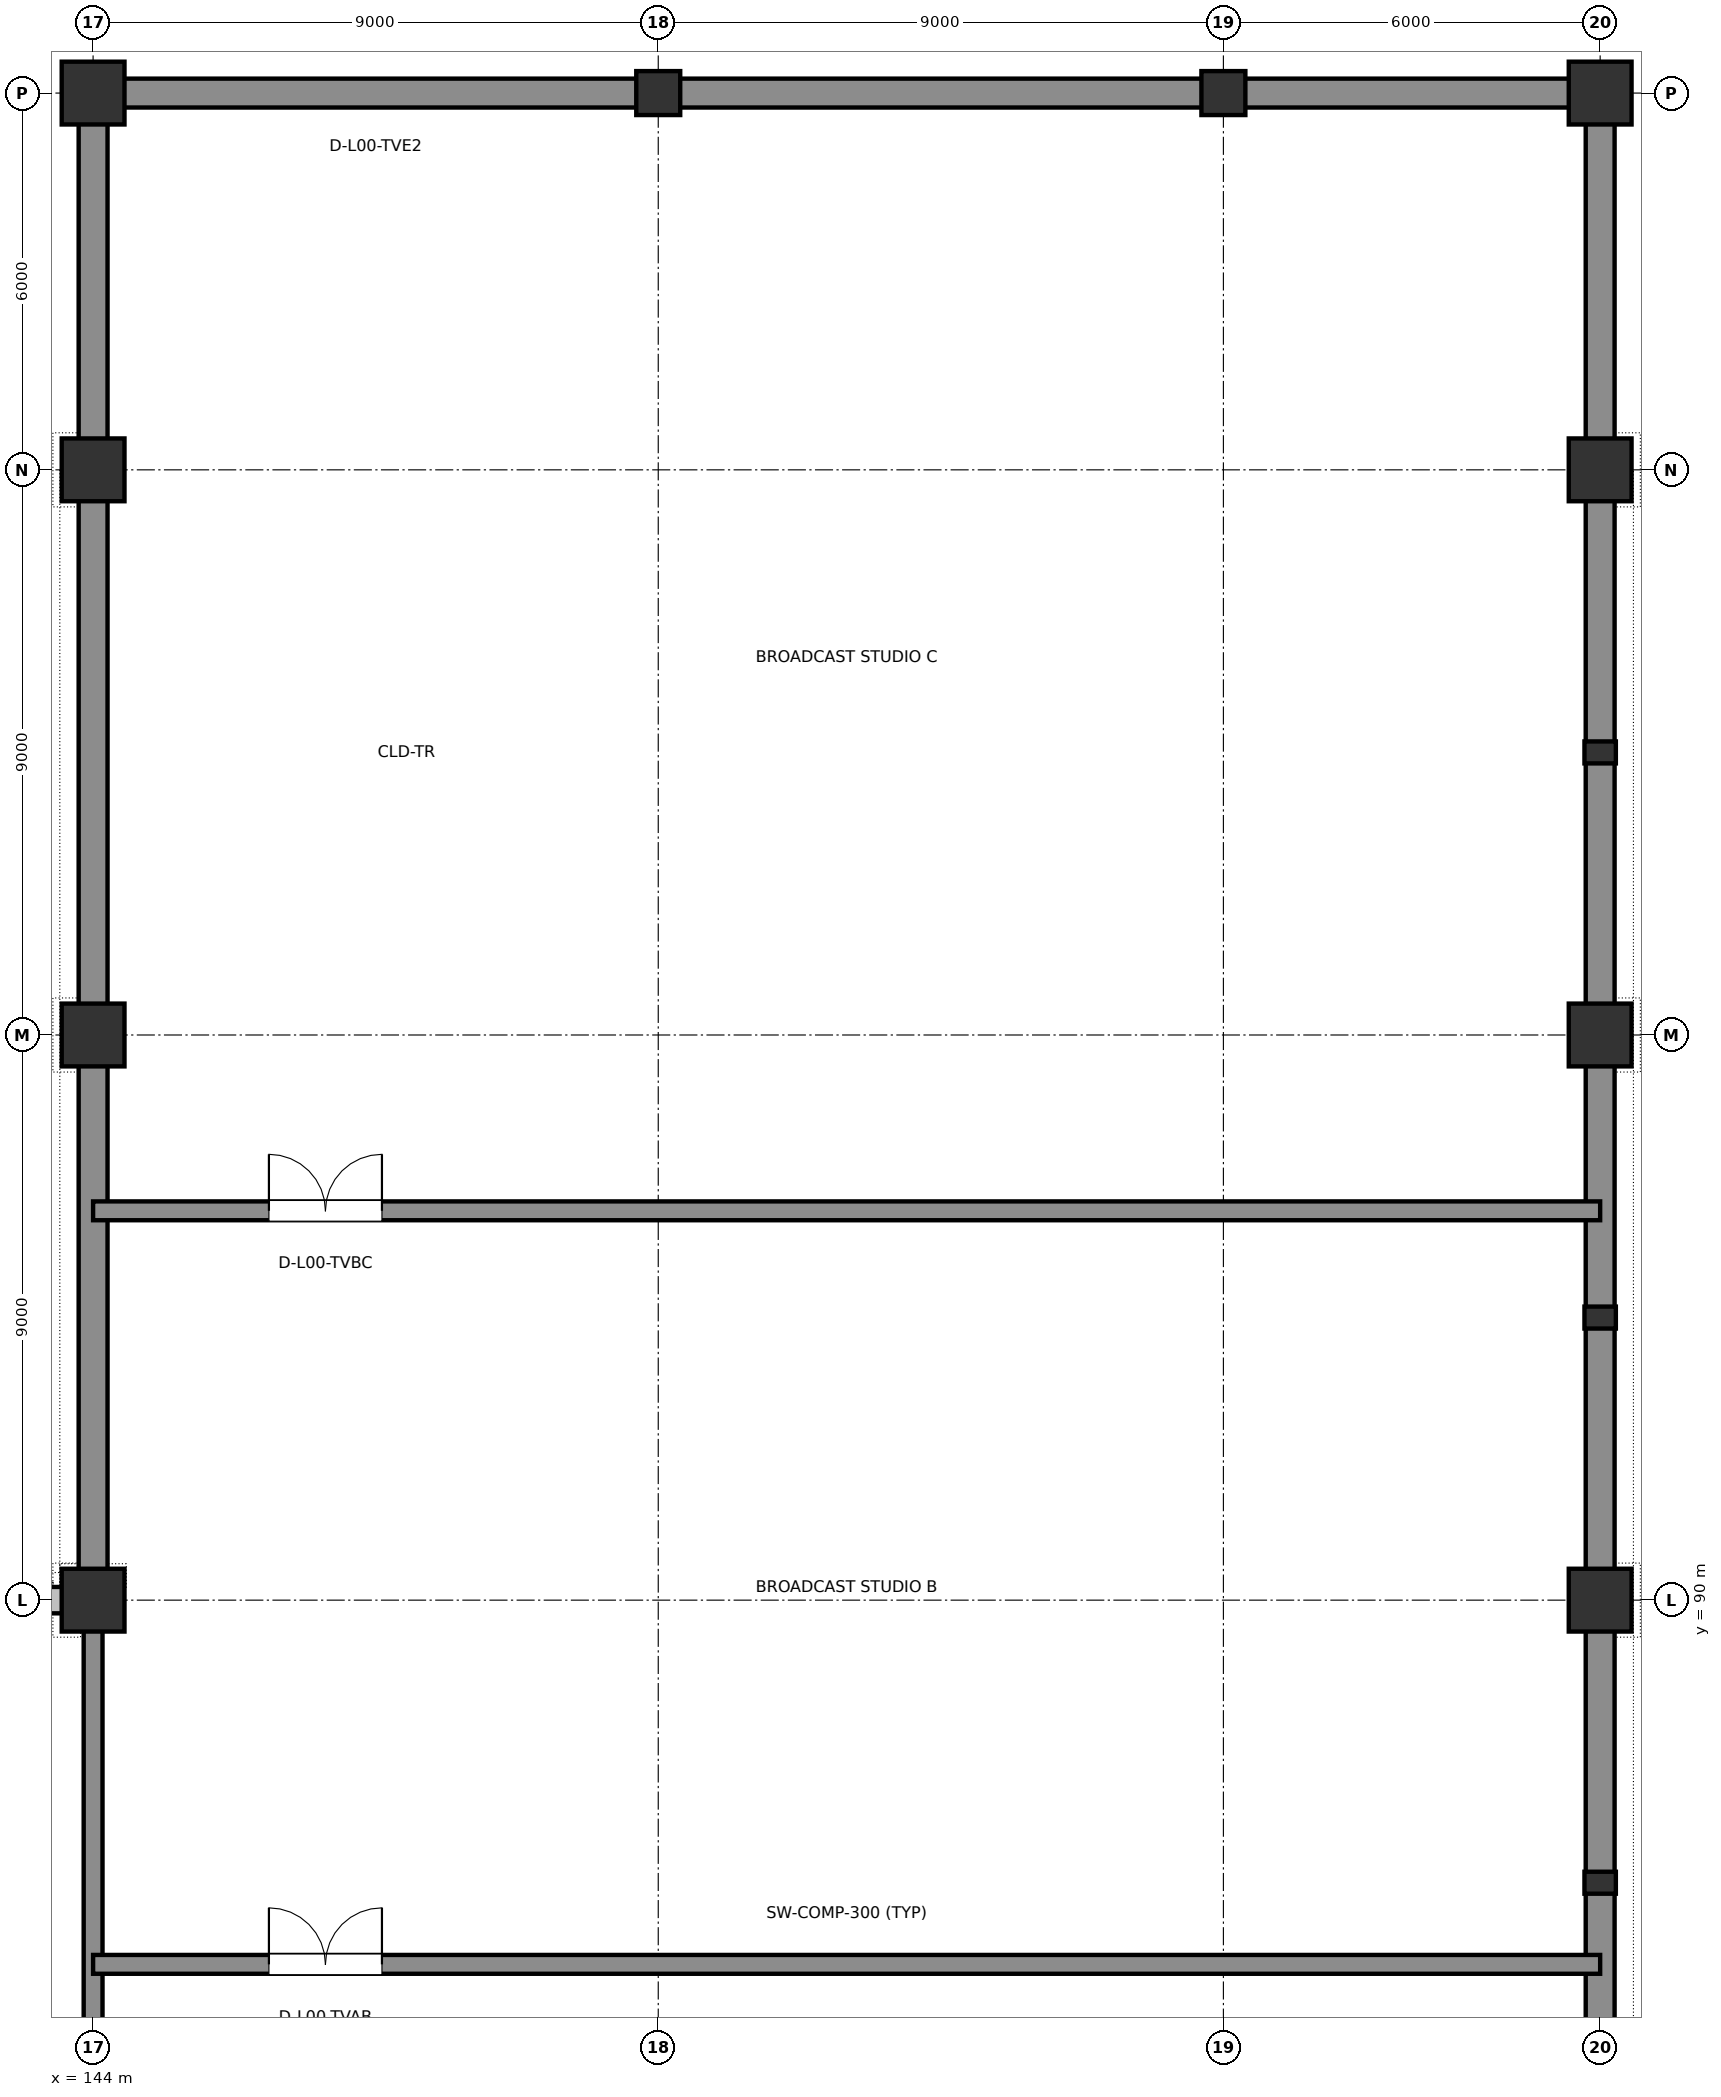
"""IFC4 building model, lengths in metres.
Left out: names, types, materials, properties, quantities, classifications, styles, units other than length and angle.
Written with IfcOpenShell. Run it as: python <this file> out.ifc"""

import sys

from ifc_helpers import new_model, si_unit, direction, frame, frame_2d, origin, origin_2d, place, context, subcontext, project, spatial, rectangle, extrude, element, fill, save


model = new_model("IFC4")
c1 = context("Model", 3, precision=1e-05, world=origin(), true_north=direction((0.0, 1.0)))
c2 = subcontext(c1, "Body", "Model", "MODEL_VIEW")
j1 = project(units=[si_unit("LENGTHUNIT", "METRE"), si_unit("PLANEANGLEUNIT", "RADIAN")], contexts=[c1])
p1 = place(None, origin())
s1 = spatial("IfcSite", under=j1, at=p1, CompositionType="ELEMENT")
p2 = place(p1, origin())
s2 = spatial("IfcBuilding", under=s1, at=p2, CompositionType="ELEMENT")
p3 = place(p2, origin())
s3 = spatial("IfcBuildingStorey", under=s2, at=p3, CompositionType="ELEMENT", Elevation=0.0)
for number, where, z_axis, x_axis in (
    (1, (168.0, 85.5, 0.0), (0.0, 0.0, 1.0), (0.0, 1.0, 0.0)),
    (2, (168.0, 94.5, 0.0), (0.0, 0.0, 1.0), (0.0, 1.0, 0.0)),
    (3, (168.0, 103.5, 0.0), (0.0, 0.0, 1.0), (0.0, 1.0, 0.0)),
):
    element("IfcColumn", number, at=place(p3, frame(where, z_axis=z_axis, x_axis=x_axis)), inside=s3, PredefinedType="PILASTER", context=c2, shape_type="SweptSolid", body=[
        extrude(rectangle(XDim=0.35, YDim=0.5, at=origin_2d()), origin(), (0.0, 0.0, 1.0), 5.4),
    ])
for number, where, z_axis, x_axis in (
    (4, (144.0, 90.0, 0.0), (0.0, 0.0, 1.0), (1.0, 0.0, 0.0)),
    (5, (144.0, 99.0, 0.0), (0.0, 0.0, 1.0), (1.0, 0.0, 0.0)),
    (6, (144.0, 108.0, 0.0), (0.0, 0.0, 1.0), (1.0, 0.0, 0.0)),
    (7, (144.0, 114.0, 0.0), (0.0, 0.0, 1.0), (1.0, 0.0, 0.0)),
):
    element("IfcColumn", number, at=place(p3, frame(where, z_axis=z_axis, x_axis=x_axis)), inside=s3, PredefinedType="COLUMN", context=c2, shape_type="SweptSolid", body=[
        extrude(rectangle(XDim=1.0, YDim=1.0, at=origin_2d()), origin(), (0.0, 0.0, 1.0), 5.4),
    ])
for number, where, z_axis, x_axis in (
    (8, (153.0, 114.0, 0.0), (0.0, 0.0, 1.0), (1.0, 0.0, 0.0)),
    (9, (162.0, 114.0, 0.0), (0.0, 0.0, 1.0), (1.0, 0.0, 0.0)),
):
    element("IfcColumn", number, at=place(p3, frame(where, z_axis=z_axis, x_axis=x_axis)), inside=s3, PredefinedType="COLUMN", context=c2, shape_type="SweptSolid", body=[
        extrude(rectangle(XDim=0.7, YDim=0.7, at=origin_2d()), origin(), (0.0, 0.0, 1.0), 5.4),
    ])
for number, where, z_axis, x_axis in (
    (10, (168.0, 90.0, 0.0), (0.0, 0.0, 1.0), (1.0, 0.0, 0.0)),
    (11, (168.0, 99.0, 0.0), (0.0, 0.0, 1.0), (1.0, 0.0, 0.0)),
    (12, (168.0, 108.0, 0.0), (0.0, 0.0, 1.0), (1.0, 0.0, 0.0)),
    (13, (168.0, 114.0, 0.0), (0.0, 0.0, 1.0), (1.0, 0.0, 0.0)),
):
    element("IfcColumn", number, at=place(p3, frame(where, z_axis=z_axis, x_axis=x_axis)), inside=s3, PredefinedType="COLUMN", context=c2, shape_type="SweptSolid", body=[
        extrude(rectangle(XDim=1.0, YDim=1.0, at=origin_2d()), origin(), (0.0, 0.0, 1.0), 5.4),
    ])
for number, where, z_axis, x_axis in (
    (14, (168.0, 81.485, 0.0), (0.0, 0.0, 1.0), (0.0, 1.0, 0.0)),
    (15, (168.0, 90.485, 0.0), (0.0, 0.0, 1.0), (0.0, 1.0, 0.0)),
    (16, (168.0, 99.485, 0.0), (0.0, 0.0, 1.0), (0.0, 1.0, 0.0)),
):
    element("IfcWall", number, at=place(p3, frame(where, z_axis=z_axis, x_axis=x_axis)), inside=s3, PredefinedType="STANDARD", context=c2, shape_type="SweptSolid", body=[
        extrude(rectangle(XDim=8.03, YDim=0.46, at=frame_2d((4.015, 0.0))), origin(), (0.0, 0.0, 1.0), 5.4),
    ])
p4 = place(p3, frame((168.0, 108.485, 0.0), z_axis=(0.0, 0.0, 1.0), x_axis=(0.0, 1.0, 0.0)))
e17 = element("IfcWall", 17, at=p4, inside=s3, PredefinedType="STANDARD", context=c2, shape_type="SweptSolid", body=[
    extrude(rectangle(XDim=5.03, YDim=0.46, at=frame_2d((2.515, 0.0))), origin(), (0.0, 0.0, 1.0), 5.4),
])
p5 = place(p3, frame((152.665, 114.0, 0.0), z_axis=(0.0, 0.0, 1.0), x_axis=(-1.0, 0.0, 0.0)))
e18 = element("IfcWall", 18, at=p5, inside=s3, PredefinedType="STANDARD", context=c2, shape_type="SweptSolid", body=[
    extrude(rectangle(XDim=8.18, YDim=0.46, at=frame_2d((4.09, 0.0))), origin(), (0.0, 0.0, 1.0), 5.4),
])
p6 = place(p5, frame((3.265, 0.0, 0.0)))
e19 = element("IfcOpeningElement", 19, at=p6, cuts=e18, PredefinedType="OPENING", context=c2, shape_type="SweptSolid", body=[
    extrude(rectangle(XDim=1.8, YDim=2.4, at=frame_2d((0.9, 1.2))), frame((0.0, 0.24, 0.0), z_axis=(0.0, -1.0, 0.0), x_axis=(1.0, 0.0, 0.0)), (0.0, 0.0, 1.0), 0.48),
])
p7 = place(p3, frame((161.665, 114.0, 0.0), z_axis=(0.0, 0.0, 1.0), x_axis=(-1.0, 0.0, 0.0)))
e20 = element("IfcWall", 20, at=p7, inside=s3, PredefinedType="STANDARD", context=c2, shape_type="SweptSolid", body=[
    extrude(rectangle(XDim=8.33, YDim=0.46, at=frame_2d((4.165, 0.0))), origin(), (0.0, 0.0, 1.0), 5.4),
])
p8 = place(p3, frame((167.515, 114.0, 0.0), z_axis=(0.0, 0.0, 1.0), x_axis=(-1.0, 0.0, 0.0)))
e21 = element("IfcWall", 21, at=p8, inside=s3, PredefinedType="STANDARD", context=c2, shape_type="SweptSolid", body=[
    extrude(rectangle(XDim=5.18, YDim=0.46, at=frame_2d((2.59, 0.0))), origin(), (0.0, 0.0, 1.0), 5.4),
])
for number, where, z_axis, x_axis in (
    (22, (144.0, 98.515, 0.0), (0.0, 0.0, 1.0), (0.0, -1.0, 0.0)),
    (23, (144.0, 107.515, 0.0), (0.0, 0.0, 1.0), (0.0, -1.0, 0.0)),
):
    element("IfcWall", number, at=place(p3, frame(where, z_axis=z_axis, x_axis=x_axis)), inside=s3, PredefinedType="STANDARD", context=c2, shape_type="SweptSolid", body=[
        extrude(rectangle(XDim=8.03, YDim=0.46, at=frame_2d((4.015, 0.0))), origin(), (0.0, 0.0, 1.0), 5.4),
    ])
p9 = place(p3, frame((144.0, 113.515, 0.0), z_axis=(0.0, 0.0, 1.0), x_axis=(0.0, -1.0, 0.0)))
e24 = element("IfcWall", 24, at=p9, inside=s3, PredefinedType="STANDARD", context=c2, shape_type="SweptSolid", body=[
    extrude(rectangle(XDim=5.03, YDim=0.46, at=frame_2d((2.515, 0.0))), origin(), (0.0, 0.0, 1.0), 5.4),
])
p10 = place(p3, frame((143.515, 90.0, 0.0), z_axis=(0.0, 0.0, 1.0), x_axis=(-1.0, 0.0, 0.0)))
e25 = element("IfcWall", 25, at=p10, inside=s3, PredefinedType="STANDARD", context=c2, shape_type="SweptSolid", body=[
    extrude(rectangle(XDim=8.13, YDim=0.42, at=frame_2d((4.065, 0.0))), origin(), (0.0, 0.0, 1.0), 4.795),
])
p11 = place(p10, frame((2.815, 0.0, 0.9)))
e26 = element("IfcOpeningElement", 26, at=p11, cuts=e25, PredefinedType="OPENING", context=c2, shape_type="SweptSolid", body=[
    extrude(rectangle(XDim=2.5, YDim=1.75, at=frame_2d((1.25, 0.875))), frame((0.0, 0.22, 0.0), z_axis=(0.0, -1.0, 0.0), x_axis=(1.0, 0.0, 0.0)), (0.0, 0.0, 1.0), 0.44),
])
p12 = place(p3, frame((144.0, 72.0, 0.0), z_axis=(0.0, 0.0, 1.0), x_axis=(0.0, 1.0, 0.0)))
e27 = element("IfcWall", 27, at=p12, inside=s3, PredefinedType="SHEAR", context=c2, shape_type="SweptSolid", body=[
    extrude(rectangle(XDim=18.0, YDim=0.3, at=frame_2d((9.0, 0.0))), origin(), (0.0, 0.0, 1.0), 5.16),
])
p13 = place(p12, frame((1.4, 0.0, 0.0)))
e28 = element("IfcOpeningElement", 28, at=p13, cuts=e27, PredefinedType="OPENING", context=c2, shape_type="SweptSolid", body=[
    extrude(rectangle(XDim=1.8, YDim=2.28, at=frame_2d((0.9, 1.14))), frame((0.0, 0.16, 0.0), z_axis=(0.0, -1.0, 0.0), x_axis=(1.0, 0.0, 0.0)), (0.0, 0.0, 1.0), 0.32),
])
p14 = place(p3, frame((144.0, 84.2, 0.0), z_axis=(0.0, 0.0, 1.0), x_axis=(1.0, 0.0, 0.0)))
e29 = element("IfcWall", 29, at=p14, inside=s3, PredefinedType="SHEAR", context=c2, shape_type="SweptSolid", body=[
    extrude(rectangle(XDim=24.0, YDim=0.3, at=frame_2d((12.0, 0.0))), origin(), (0.0, 0.0, 1.0), 5.16),
])
p15 = place(p14, frame((2.8, 0.0, 0.0)))
e30 = element("IfcOpeningElement", 30, at=p15, cuts=e29, PredefinedType="OPENING", context=c2, shape_type="SweptSolid", body=[
    extrude(rectangle(XDim=1.8, YDim=2.28, at=frame_2d((0.9, 1.14))), frame((0.0, 0.16, 0.0), z_axis=(0.0, -1.0, 0.0), x_axis=(1.0, 0.0, 0.0)), (0.0, 0.0, 1.0), 0.32),
])
p16 = place(p3, frame((144.0, 96.2, 0.0), z_axis=(0.0, 0.0, 1.0), x_axis=(1.0, 0.0, 0.0)))
e31 = element("IfcWall", 31, at=p16, inside=s3, PredefinedType="SHEAR", context=c2, shape_type="SweptSolid", body=[
    extrude(rectangle(XDim=24.0, YDim=0.3, at=frame_2d((12.0, 0.0))), origin(), (0.0, 0.0, 1.0), 5.16),
])
p17 = place(p16, frame((2.8, 0.0, 0.0)))
e32 = element("IfcOpeningElement", 32, at=p17, cuts=e31, PredefinedType="OPENING", context=c2, shape_type="SweptSolid", body=[
    extrude(rectangle(XDim=1.8, YDim=2.28, at=frame_2d((0.9, 1.14))), frame((0.0, 0.16, 0.0), z_axis=(0.0, -1.0, 0.0), x_axis=(1.0, 0.0, 0.0)), (0.0, 0.0, 1.0), 0.32),
])
p18 = place(p6, frame((1.8, 0.0, 0.0), z_axis=(0.0, 0.0, 1.0), x_axis=(-1.0, 0.0, 0.0)))
e33 = element("IfcDoor", 33, at=p18, inside=s3, OperationType="DOUBLE_DOOR_SINGLE_SWING", PredefinedType="DOOR", context=c2, shape_type="SweptSolid", body=[
    extrude(rectangle(XDim=1.8, YDim=2.4, at=frame_2d((0.9, 1.2))), frame((0.0, 0.025, 0.0), z_axis=(0.0, -1.0, 0.0), x_axis=(1.0, 0.0, 0.0)), (0.0, 0.0, 1.0), 0.05),
])
fill(e19, e33)
p19 = place(p15, origin())
e34 = element("IfcDoor", 34, at=p19, inside=s3, OperationType="DOUBLE_DOOR_SINGLE_SWING", PredefinedType="DOOR", context=c2, shape_type="SweptSolid", body=[
    extrude(rectangle(XDim=1.8, YDim=2.28, at=frame_2d((0.9, 1.14))), frame((0.0, 0.025, 0.0), z_axis=(0.0, -1.0, 0.0), x_axis=(1.0, 0.0, 0.0)), (0.0, 0.0, 1.0), 0.05),
])
fill(e30, e34)
p20 = place(p17, origin())
e35 = element("IfcDoor", 35, at=p20, inside=s3, OperationType="DOUBLE_DOOR_SINGLE_SWING", PredefinedType="DOOR", context=c2, shape_type="SweptSolid", body=[
    extrude(rectangle(XDim=1.8, YDim=2.28, at=frame_2d((0.9, 1.14))), frame((0.0, 0.025, 0.0), z_axis=(0.0, -1.0, 0.0), x_axis=(1.0, 0.0, 0.0)), (0.0, 0.0, 1.0), 0.05),
])
fill(e32, e35)
save(model, sys.argv[1])
